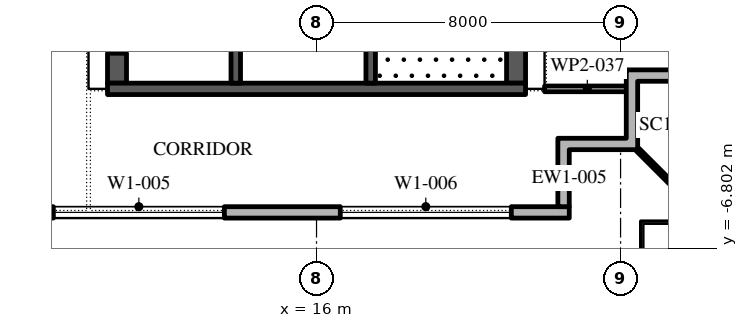
"""IFC4 building model, lengths in metres.
Left out: names, types, materials, properties, quantities, classifications, styles, units other than length and angle.
Written with IfcOpenShell. Run it as: python <this file> out.ifc"""

import sys

from ifc_helpers import new_model, si_unit, direction, frame, frame_2d, origin, place, context, subcontext, project, spatial, polyline, rectangle, outline, extrude, element, fill, save


model = new_model("IFC4")
c1 = context("Model", 3, precision=1e-05, world=origin(), true_north=direction((0.0, 1.0)))
c2 = subcontext(c1, "Body", "Model", "MODEL_VIEW")
j1 = project(units=[si_unit("LENGTHUNIT", "METRE"), si_unit("PLANEANGLEUNIT", "RADIAN")], contexts=[c1])
p1 = place(None, origin())
s1 = spatial("IfcSite", under=j1, at=p1, CompositionType="ELEMENT")
p2 = place(p1, origin())
s2 = spatial("IfcBuilding", under=s1, at=p2, CompositionType="ELEMENT")
p3 = place(p2, frame((0.0, 0.0, 346.8)))
s3 = spatial("IfcBuildingStorey", under=s2, at=p3, CompositionType="ELEMENT", Elevation=346.8)
p4 = place(p3, frame((-22.35, -5.85, 0.0), z_axis=(0.0, 0.0, 1.0), x_axis=(1.0, 0.0, 0.0)))
e1 = element("IfcWall", 1, at=p4, inside=s3, PredefinedType="STANDARD", context=c2, shape_type="SweptSolid", body=[
    extrude(rectangle(XDim=45.0, YDim=0.3, at=frame_2d((22.5, 0.0))), origin(), (0.0, 0.0, 1.0), 4.0),
])
p5 = place(p4, frame((1.375, 0.0, 0.45)))
e2 = element("IfcOpeningElement", 2, at=p5, cuts=e1, PredefinedType="OPENING", context=c2, shape_type="SweptSolid", body=[
    extrude(rectangle(XDim=4.5, YDim=3.05, at=frame_2d((2.25, 1.525))), frame((0.0, 0.16, 0.0), z_axis=(0.0, -1.0, 0.0), x_axis=(1.0, 0.0, 0.0)), (0.0, 0.0, 1.0), 0.32),
])
p6 = place(p4, frame((8.775, 0.0, 0.45)))
e3 = element("IfcOpeningElement", 3, at=p6, cuts=e1, PredefinedType="OPENING", context=c2, shape_type="SweptSolid", body=[
    extrude(rectangle(XDim=4.5, YDim=3.05, at=frame_2d((2.25, 1.525))), frame((0.0, 0.16, 0.0), z_axis=(0.0, -1.0, 0.0), x_axis=(1.0, 0.0, 0.0)), (0.0, 0.0, 1.0), 0.32),
])
p7 = place(p4, frame((17.375, 0.0, 0.0)))
e4 = element("IfcOpeningElement", 4, at=p7, cuts=e1, PredefinedType="OPENING", context=c2, shape_type="SweptSolid", body=[
    extrude(rectangle(XDim=2.4, YDim=3.5, at=frame_2d((1.2, 1.75))), frame((0.0, 0.16, 0.0), z_axis=(0.0, -1.0, 0.0), x_axis=(1.0, 0.0, 0.0)), (0.0, 0.0, 1.0), 0.32),
])
p8 = place(p4, frame((23.875, 0.0, 0.45)))
e5 = element("IfcOpeningElement", 5, at=p8, cuts=e1, PredefinedType="OPENING", context=c2, shape_type="SweptSolid", body=[
    extrude(rectangle(XDim=4.5, YDim=3.05, at=frame_2d((2.25, 1.525))), frame((0.0, 0.16, 0.0), z_axis=(0.0, -1.0, 0.0), x_axis=(1.0, 0.0, 0.0)), (0.0, 0.0, 1.0), 0.32),
])
p9 = place(p4, frame((31.425, 0.0, 0.45)))
e6 = element("IfcOpeningElement", 6, at=p9, cuts=e1, PredefinedType="OPENING", context=c2, shape_type="SweptSolid", body=[
    extrude(rectangle(XDim=4.5, YDim=3.05, at=frame_2d((2.25, 1.525))), frame((0.0, 0.16, 0.0), z_axis=(0.0, -1.0, 0.0), x_axis=(1.0, 0.0, 0.0)), (0.0, 0.0, 1.0), 0.32),
])
p10 = place(p4, frame((38.975, 0.0, 0.45)))
e7 = element("IfcOpeningElement", 7, at=p10, cuts=e1, PredefinedType="OPENING", context=c2, shape_type="SweptSolid", body=[
    extrude(rectangle(XDim=4.5, YDim=3.05, at=frame_2d((2.25, 1.525))), frame((0.0, 0.16, 0.0), z_axis=(0.0, -1.0, 0.0), x_axis=(1.0, 0.0, 0.0)), (0.0, 0.0, 1.0), 0.32),
])
p11 = place(p3, origin())
e8 = element("IfcWall", 8, at=p11, inside=s3, PredefinedType="STANDARD", context=c2, shape_type="SweptSolid", body=[
    extrude(outline(polyline([(24.15, -3.9), (24.15, -2.1), (26.25, -2.1), (26.25, -2.4), (24.45, -2.4), (24.45, -4.2), (22.65, -4.2), (22.65, -5.7), (22.35, -5.7), (22.35, -3.9), (24.15, -3.9)])), origin(), (0.0, 0.0, 1.0), 4.0),
])
p12 = place(p3, frame((24.45, -4.2, -0.05), z_axis=(0.0, 0.0, 1.0), x_axis=(0.707106781187, -0.707106781187, 0.0)))
e9 = element("IfcWall", 9, at=p12, inside=s3, PredefinedType="STANDARD", context=c2, shape_type="SweptSolid", body=[
    extrude(rectangle(XDim=2.667, YDim=0.1, at=frame_2d((1.333, 0.0))), origin(), (0.0, 0.0, 1.0), 4.05),
])
p13 = place(p3, frame((21.25, -2.45, 0.0), z_axis=(0.0, 0.0, 1.0), x_axis=(0.0, 1.0, 0.0)))
e10 = element("IfcWall", 10, at=p13, inside=s3, PredefinedType="SHEAR", context=c2, shape_type="SweptSolid", body=[
    extrude(rectangle(XDim=27.9, YDim=0.5, at=frame_2d((13.95, 0.0))), origin(), (0.0, 0.0, 1.0), 4.0),
])
p14 = place(p13, frame((5.05, 0.0, 0.0)))
e11 = element("IfcOpeningElement", 11, at=p14, cuts=e10, PredefinedType="OPENING", context=c2, shape_type="SweptSolid", body=[
    extrude(rectangle(XDim=1.2, YDim=2.1, at=frame_2d((0.6, 1.05))), frame((0.0, 0.26, 0.0), z_axis=(0.0, -1.0, 0.0), x_axis=(1.0, 0.0, 0.0)), (0.0, 0.0, 1.0), 0.52),
])
p15 = place(p13, frame((21.65, 0.0, 0.0)))
e12 = element("IfcOpeningElement", 12, at=p15, cuts=e10, PredefinedType="OPENING", context=c2, shape_type="SweptSolid", body=[
    extrude(rectangle(XDim=1.2, YDim=2.1, at=frame_2d((0.6, 1.05))), frame((0.0, 0.26, 0.0), z_axis=(0.0, -1.0, 0.0), x_axis=(1.0, 0.0, 0.0)), (0.0, 0.0, 1.0), 0.52),
])
p16 = place(p3, frame((10.75, -2.45, 0.0), z_axis=(0.0, 0.0, 1.0), x_axis=(0.0, 1.0, 0.0)))
e13 = element("IfcWall", 13, at=p16, inside=s3, PredefinedType="SHEAR", context=c2, shape_type="SweptSolid", body=[
    extrude(rectangle(XDim=27.9, YDim=0.5, at=frame_2d((13.95, 0.0))), origin(), (0.0, 0.0, 1.0), 4.0),
])
p17 = place(p16, frame((23.65, 0.0, 0.0)))
e14 = element("IfcOpeningElement", 14, at=p17, cuts=e13, PredefinedType="OPENING", context=c2, shape_type="SweptSolid", body=[
    extrude(rectangle(XDim=2.4, YDim=2.1, at=frame_2d((1.2, 1.05))), frame((0.0, 0.26, 0.0), z_axis=(0.0, -1.0, 0.0), x_axis=(1.0, 0.0, 0.0)), (0.0, 0.0, 1.0), 0.52),
])
p18 = place(p16, frame((0.788, 0.0, 0.0)))
e15 = element("IfcOpeningElement", 15, at=p18, cuts=e13, PredefinedType="OPENING", context=c2, shape_type="SweptSolid", body=[
    extrude(rectangle(XDim=0.9, YDim=2.1, at=frame_2d((0.45, 1.05))), frame((0.0, 0.26, 0.0), z_axis=(0.0, -1.0, 0.0), x_axis=(1.0, 0.0, 0.0)), (0.0, 0.0, 1.0), 0.52),
])
p19 = place(p16, frame((3.962, 0.0, 0.0)))
e16 = element("IfcOpeningElement", 16, at=p19, cuts=e13, PredefinedType="OPENING", context=c2, shape_type="SweptSolid", body=[
    extrude(rectangle(XDim=1.0, YDim=2.1, at=frame_2d((0.5, 1.05))), frame((0.0, 0.26, 0.0), z_axis=(0.0, -1.0, 0.0), x_axis=(1.0, 0.0, 0.0)), (0.0, 0.0, 1.0), 0.52),
])
p20 = place(p3, frame((10.5, -2.6, 0.0), z_axis=(0.0, 0.0, 1.0), x_axis=(1.0, 0.0, 0.0)))
e17 = element("IfcWall", 17, at=p20, inside=s3, PredefinedType="SHEAR", context=c2, shape_type="SweptSolid", body=[
    extrude(rectangle(XDim=11.0, YDim=0.3, at=frame_2d((5.5, 0.0))), origin(), (0.0, 0.0, 1.0), 4.0),
])
p21 = place(p3, frame((17.425, -2.45, 0.0), z_axis=(0.0, 0.0, 1.0), x_axis=(0.0, 1.0, 0.0)))
e18 = element("IfcWall", 18, at=p21, inside=s3, PredefinedType="SHEAR", context=c2, shape_type="SweptSolid", body=[
    extrude(rectangle(XDim=6.3, YDim=0.25, at=frame_2d((3.15, 0.0))), origin(), (0.0, 0.0, 1.0), 4.0),
])
p22 = place(p21, frame((5.05, 0.0, 0.0)))
e19 = element("IfcOpeningElement", 19, at=p22, cuts=e18, PredefinedType="OPENING", context=c2, shape_type="SweptSolid", body=[
    extrude(rectangle(XDim=1.2, YDim=2.1, at=frame_2d((0.6, 1.05))), frame((0.0, 0.135, 0.0), z_axis=(0.0, -1.0, 0.0), x_axis=(1.0, 0.0, 0.0)), (0.0, 0.0, 1.0), 0.27),
])
p23 = place(p3, frame((13.875, -2.45, 0.0), z_axis=(0.0, 0.0, 1.0), x_axis=(0.0, 1.0, 0.0)))
e20 = element("IfcWall", 20, at=p23, inside=s3, PredefinedType="SHEAR", context=c2, shape_type="SweptSolid", body=[
    extrude(rectangle(XDim=21.3, YDim=0.25, at=frame_2d((10.65, 0.0))), origin(), (0.0, 0.0, 1.0), 4.0),
])
p24 = place(p23, frame((11.357, 0.0, 0.0)))
e21 = element("IfcOpeningElement", 21, at=p24, cuts=e20, PredefinedType="OPENING", context=c2, shape_type="SweptSolid", body=[
    extrude(rectangle(XDim=0.9, YDim=2.1, at=frame_2d((0.45, 1.05))), frame((0.0, 0.135, 0.0), z_axis=(0.0, -1.0, 0.0), x_axis=(1.0, 0.0, 0.0)), (0.0, 0.0, 1.0), 0.27),
])
p25 = place(p23, frame((6.971, 0.0, 0.0)))
e22 = element("IfcOpeningElement", 22, at=p25, cuts=e20, PredefinedType="OPENING", context=c2, shape_type="SweptSolid", body=[
    extrude(rectangle(XDim=1.1, YDim=2.1, at=frame_2d((0.55, 1.05))), frame((0.0, 0.135, 0.0), z_axis=(0.0, -1.0, 0.0), x_axis=(1.0, 0.0, 0.0)), (0.0, 0.0, 1.0), 0.27),
])
p26 = place(p23, frame((15.543, 0.0, 0.0)))
e23 = element("IfcOpeningElement", 23, at=p26, cuts=e20, PredefinedType="OPENING", context=c2, shape_type="SweptSolid", body=[
    extrude(rectangle(XDim=1.1, YDim=2.1, at=frame_2d((0.55, 1.05))), frame((0.0, 0.135, 0.0), z_axis=(0.0, -1.0, 0.0), x_axis=(1.0, 0.0, 0.0)), (0.0, 0.0, 1.0), 0.27),
])
p27 = place(p23, frame((17.686, 0.0, 0.0)))
e24 = element("IfcOpeningElement", 24, at=p27, cuts=e20, PredefinedType="OPENING", context=c2, shape_type="SweptSolid", body=[
    extrude(rectangle(XDim=1.1, YDim=2.1, at=frame_2d((0.55, 1.05))), frame((0.0, 0.135, 0.0), z_axis=(0.0, -1.0, 0.0), x_axis=(1.0, 0.0, 0.0)), (0.0, 0.0, 1.0), 0.27),
])
p28 = place(p23, frame((19.829, 0.0, 0.0)))
e25 = element("IfcOpeningElement", 25, at=p28, cuts=e20, PredefinedType="OPENING", context=c2, shape_type="SweptSolid", body=[
    extrude(rectangle(XDim=1.1, YDim=2.1, at=frame_2d((0.55, 1.05))), frame((0.0, 0.135, 0.0), z_axis=(0.0, -1.0, 0.0), x_axis=(1.0, 0.0, 0.0)), (0.0, 0.0, 1.0), 0.27),
])
p29 = place(p3, frame((22.0, -2.6, 0.0), z_axis=(0.0, 0.0, 1.0), x_axis=(1.0, 0.0, 0.0)))
e26 = element("IfcWall", 26, at=p29, inside=s3, PredefinedType="PARTITIONING", context=c2, shape_type="SweptSolid", body=[
    extrude(rectangle(XDim=2.25, YDim=0.15, at=frame_2d((1.125, 0.0))), origin(), (0.0, 0.0, 1.0), 4.0),
])
p30 = place(p9, origin())
e27 = element("IfcWindow", 27, at=p30, inside=s3, PartitioningType="DOUBLE_PANEL_VERTICAL", PredefinedType="WINDOW", context=c2, shape_type="SweptSolid", body=[
    extrude(rectangle(XDim=4.5, YDim=3.05, at=frame_2d((2.25, 1.525))), frame((0.0, 0.03, 0.0), z_axis=(0.0, -1.0, 0.0), x_axis=(1.0, 0.0, 0.0)), (0.0, 0.0, 1.0), 0.06),
])
fill(e6, e27)
p31 = place(p10, origin())
e28 = element("IfcWindow", 28, at=p31, inside=s3, PartitioningType="DOUBLE_PANEL_VERTICAL", PredefinedType="WINDOW", context=c2, shape_type="SweptSolid", body=[
    extrude(rectangle(XDim=4.5, YDim=3.05, at=frame_2d((2.25, 1.525))), frame((0.0, 0.03, 0.0), z_axis=(0.0, -1.0, 0.0), x_axis=(1.0, 0.0, 0.0)), (0.0, 0.0, 1.0), 0.06),
])
fill(e7, e28)
p32 = place(p18, origin())
e29 = element("IfcDoor", 29, at=p32, inside=s3, OperationType="SINGLE_SWING_LEFT", PredefinedType="DOOR", context=c2, shape_type="SweptSolid", body=[
    extrude(rectangle(XDim=0.9, YDim=2.1, at=frame_2d((0.45, 1.05))), frame((0.0, -0.2, 0.0), z_axis=(0.0, -1.0, 0.0), x_axis=(1.0, 0.0, 0.0)), (0.0, 0.0, 1.0), 0.05),
])
fill(e15, e29)
save(model, sys.argv[1])
